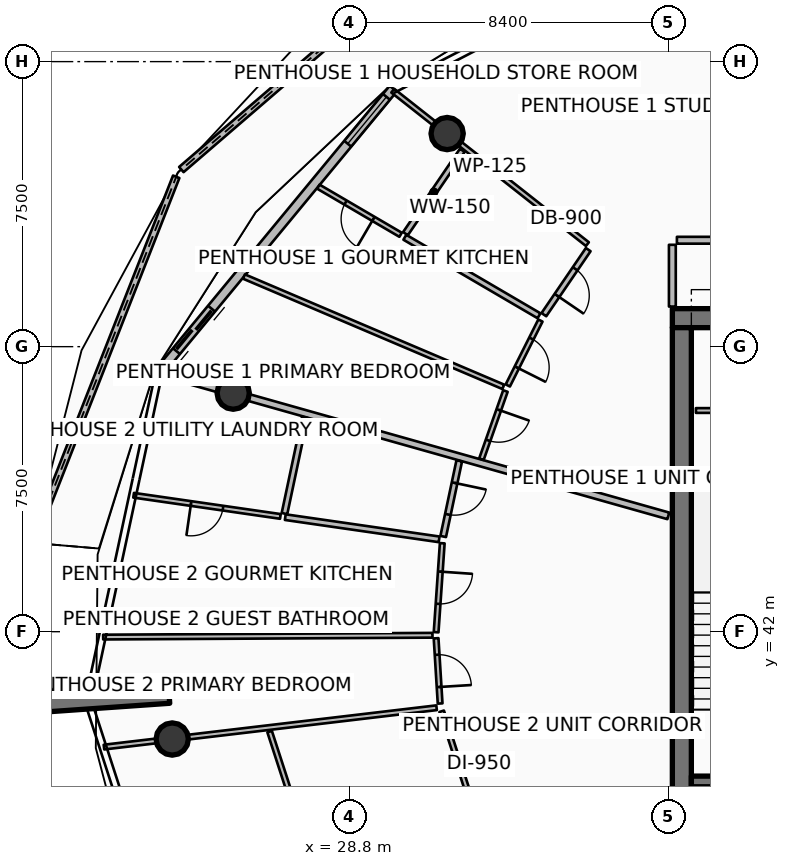
"""IFC4 building model, lengths in metres.
Left out: names, types, materials, properties, quantities, classifications, styles, units other than length and angle.
Written with IfcOpenShell. Run it as: python <this file> out.ifc"""

import sys

from ifc_helpers import new_model, si_unit, direction, frame, frame_2d, origin, origin_2d, place, context, subcontext, project, spatial, polyline, rectangle, circle, outline, extrude, element, fill, save


model = new_model("IFC4")
c1 = context("Model", 3, precision=1e-05, world=origin(), true_north=direction((0.0, 1.0)))
c2 = subcontext(c1, "Body", "Model", "MODEL_VIEW")
j1 = project(units=[si_unit("LENGTHUNIT", "METRE"), si_unit("PLANEANGLEUNIT", "RADIAN")], contexts=[c1])
p1 = place(None, origin())
s1 = spatial("IfcSite", under=j1, at=p1, CompositionType="ELEMENT")
p2 = place(p1, origin())
s2 = spatial("IfcBuilding", under=s1, at=p2, CompositionType="ELEMENT")
p3 = place(p2, frame((0.0, 0.0, 334.7)))
s3 = spatial("IfcBuildingStorey", under=s2, at=p3, CompositionType="ELEMENT", Elevation=334.7)
p4 = place(p3, frame((37.3, 50.25, 0.0), z_axis=(0.0, 0.0, 1.0), x_axis=(1.0, 0.0, 0.0)))
e1 = element("IfcWall", 1, at=p4, inside=s3, PredefinedType="SHEAR", context=c2, shape_type="SweptSolid", body=[
    extrude(rectangle(XDim=9.6, YDim=0.5, at=frame_2d((4.8, 0.0))), origin(), (0.0, 0.0, 1.0), 4.2),
])
p5 = place(p3, frame((37.55, 34.0, 0.0), z_axis=(0.0, 0.0, 1.0), x_axis=(0.0, 1.0, 0.0)))
e2 = element("IfcWall", 2, at=p5, inside=s3, PredefinedType="SHEAR", context=c2, shape_type="SweptSolid", body=[
    extrude(rectangle(XDim=16.0, YDim=0.5, at=frame_2d((8.0, 0.0))), origin(), (0.0, 0.0, 1.0), 4.2),
])
for number, where, z_axis, x_axis in (
    (3, (37.8, 38.06, 0.0), (0.0, 0.0, 1.0), (1.0, 0.0, 0.0)),
    (4, (37.8, 45.94, 0.0), (0.0, 0.0, 1.0), (1.0, 0.0, 0.0)),
):
    element("IfcWall", number, at=place(p3, frame(where, z_axis=z_axis, x_axis=x_axis)), inside=s3, PredefinedType="SHEAR", context=c2, shape_type="SweptSolid", body=[
        extrude(rectangle(XDim=3.5, YDim=0.28, at=frame_2d((1.75, 0.0))), origin(), (0.0, 0.0, 1.0), 4.2),
    ])
p6 = place(p3, frame((24.059, 40.326, 0.0), z_axis=(0.0, 0.0, 1.0), x_axis=(-0.997564163539, -0.069754853754, 0.0)))
e5 = element("IfcWall", 5, at=p6, inside=s3, PredefinedType="SOLIDWALL", context=c2, shape_type="SweptSolid", body=[
    extrude(rectangle(XDim=3.5, YDim=0.42, at=frame_2d((1.75, 0.0))), origin(), (0.0, 0.0, 1.0), 4.2),
])
for number, where, z_axis, x_axis in (
    (6, (31.374, 55.107, 0.0), (0.0, 0.0, 1.0), (1.0, 0.0, 0.0)),
    (7, (25.744, 48.277, 0.0), (0.0, 0.0, 1.0), (1.0, 0.0, 0.0)),
    (8, (24.14, 39.176, 0.0), (0.0, 0.0, 1.0), (1.0, 0.0, 0.0)),
):
    element("IfcColumn", number, at=place(p3, frame(where, z_axis=z_axis, x_axis=x_axis)), inside=s3, PredefinedType="COLUMN", context=c2, shape_type="SweptSolid", body=[
        extrude(circle(Radius=0.425, at=origin_2d()), origin(), (0.0, 0.0, 1.0), 3.94),
    ])
p7 = place(p3, frame((31.893, 60.627, 0.0), z_axis=(0.0, 0.0, 1.0), x_axis=(-0.757886838831, -0.652386035662, 0.0)))
e9 = element("IfcWall", 9, at=p7, inside=s3, PredefinedType="PARAPET", context=c2, shape_type="SweptSolid", body=[
    extrude(outline(polyline([(0.0, 0.0), (9.914, 0.0), (9.914, 1.632), (4.957, 1.798), (0.0, 1.86), (0.0, 0.0)])), frame((0.0, 0.09, 0.0), z_axis=(0.0, -1.0, 0.0), x_axis=(1.0, 0.0, 0.0)), (0.0, 0.0, 1.0), 0.18),
])
p8 = place(p3, frame((24.245, 53.97, 0.0), z_axis=(0.0, 0.0, 1.0), x_axis=(-0.36569397139, -0.930735149916, 0.0)))
e10 = element("IfcWall", 10, at=p8, inside=s3, PredefinedType="PARAPET", context=c2, shape_type="SweptSolid", body=[
    extrude(outline(polyline([(0.0, 0.0), (10.35, 0.0), (10.35, 1.233), (5.175, 1.418), (0.0, 1.632), (0.0, 0.0)])), frame((0.0, 0.09, 0.0), z_axis=(0.0, -1.0, 0.0), x_axis=(1.0, 0.0, 0.0)), (0.0, 0.0, 1.0), 0.18),
])
p9 = place(p3, frame((29.955, 56.289, 0.0), z_axis=(0.0, 0.0, 1.0), x_axis=(-0.636803612721, -0.771026042897, 0.0)))
e11 = element("IfcWall", 11, at=p9, inside=s3, PredefinedType="SOLIDWALL", context=c2, shape_type="SweptSolid", body=[
    extrude(rectangle(XDim=9.728, YDim=0.24, at=frame_2d((4.864, 0.0))), origin(), (0.0, 0.0, 1.0), 2.89),
])
p10 = place(p9, frame((7.508, 0.0, 0.0)))
e12 = element("IfcOpeningElement", 12, at=p10, cuts=e11, PredefinedType="OPENING", context=c2, shape_type="SweptSolid", body=[
    extrude(rectangle(XDim=1.45, YDim=2.15, at=frame_2d((0.725, 1.075))), frame((0.0, 0.13, 0.0), z_axis=(0.0, -1.0, 0.0), x_axis=(1.0, 0.0, 0.0)), (0.0, 0.0, 1.0), 0.26),
])
p11 = place(p9, frame((0.28, 0.0, 0.65)))
e13 = element("IfcOpeningElement", 13, at=p11, cuts=e11, PredefinedType="OPENING", context=c2, shape_type="SweptSolid", body=[
    extrude(rectangle(XDim=1.6, YDim=1.5, at=frame_2d((0.8, 0.75))), frame((0.0, 0.13, 0.0), z_axis=(0.0, -1.0, 0.0), x_axis=(1.0, 0.0, 0.0)), (0.0, 0.0, 1.0), 0.26),
])
p12 = place(p3, frame((37.92, 47.82, 0.0), z_axis=(0.0, 0.0, 1.0), x_axis=(1.0, 0.0, 0.0)))
e14 = element("IfcWall", 14, at=p12, inside=s3, PredefinedType="PARTITIONING", context=c2, shape_type="SweptSolid", body=[
    extrude(rectangle(XDim=4.08, YDim=0.125, at=frame_2d((2.04, 0.0))), origin(), (0.0, 0.0, 1.0), 3.38),
])
p13 = place(p12, frame((1.615, 0.0, 0.0)))
e15 = element("IfcOpeningElement", 15, at=p13, cuts=e14, PredefinedType="OPENING", context=c2, shape_type="SweptSolid", body=[
    extrude(rectangle(XDim=0.85, YDim=2.06, at=frame_2d((0.425, 1.03))), frame((0.0, 0.073, 0.0), z_axis=(0.0, -1.0, 0.0), x_axis=(1.0, 0.0, 0.0)), (0.0, 0.0, 1.0), 0.145),
])
p14 = place(p3, frame((42.232, 52.3, 0.0), z_axis=(0.0, 0.0, 1.0), x_axis=(-0.488623665245, 0.872494649704, 0.0)))
e16 = element("IfcWall", 16, at=p14, inside=s3, PredefinedType="PARTITIONING", context=c2, shape_type="SweptSolid", body=[
    extrude(rectangle(XDim=9.157, YDim=0.18, at=frame_2d((4.579, 0.0))), origin(), (0.0, 0.0, 1.0), 3.38),
])
p15 = place(p3, frame((37.194, 45.048, 0.0), z_axis=(0.0, 0.0, 1.0), x_axis=(-0.962457024049, 0.271434111451, 0.0)))
e17 = element("IfcWall", 17, at=p15, inside=s3, PredefinedType="PARTITIONING", context=c2, shape_type="SweptSolid", body=[
    extrude(rectangle(XDim=13.799, YDim=0.18, at=frame_2d((6.9, 0.0))), origin(), (0.0, 0.0, 1.0), 3.38),
])
p16 = place(p3, frame((42.112, 52.3, 0.0), z_axis=(0.0, 0.0, 1.0), x_axis=(-1.0, 0.0, 0.0)))
e18 = element("IfcWall", 18, at=p16, inside=s3, PredefinedType="PARTITIONING", context=c2, shape_type="SweptSolid", body=[
    extrude(rectangle(XDim=4.692, YDim=0.18, at=frame_2d((2.346, 0.0))), origin(), (0.0, 0.0, 1.0), 3.38),
])
p17 = place(p16, frame((1.796, 0.0, 0.0)))
e19 = element("IfcOpeningElement", 19, at=p17, cuts=e18, PredefinedType="OPENING", context=c2, shape_type="SweptSolid", body=[
    extrude(rectangle(XDim=1.1, YDim=2.1, at=frame_2d((0.55, 1.05))), frame((0.0, 0.1, 0.0), z_axis=(0.0, -1.0, 0.0), x_axis=(1.0, 0.0, 0.0)), (0.0, 0.0, 1.0), 0.2),
])
p18 = place(p3, frame((37.3, 52.18, 0.0), z_axis=(0.0, 0.0, 1.0), x_axis=(0.0, -1.0, 0.0)))
e20 = element("IfcWall", 20, at=p18, inside=s3, PredefinedType="PARTITIONING", context=c2, shape_type="SweptSolid", body=[
    extrude(rectangle(XDim=1.625, YDim=0.18, at=frame_2d((0.812, 0.0))), origin(), (0.0, 0.0, 1.0), 3.38),
])
p19 = place(p3, frame((35.064, 52.198, 0.0), z_axis=(0.0, 0.0, 1.0), x_axis=(-0.785319571145, 0.619090600136, 0.0)))
e21 = element("IfcWall", 21, at=p19, inside=s3, PredefinedType="PARTITIONING", context=c2, shape_type="SweptSolid", body=[
    extrude(rectangle(XDim=6.521, YDim=0.125, at=frame_2d((3.26, 0.0))), origin(), (0.0, 0.0, 1.0), 3.38),
])
p20 = place(p3, frame((35.086, 52.053, 0.0), z_axis=(0.0, 0.0, 1.0), x_axis=(-0.563373395767, -0.826202406763, 0.0)))
e22 = element("IfcWall", 22, at=p20, inside=s3, PredefinedType="PARTITIONING", context=c2, shape_type="SweptSolid", body=[
    extrude(rectangle(XDim=2.072, YDim=0.15, at=frame_2d((1.036, 0.0))), origin(), (0.0, 0.0, 1.0), 3.38),
])
p21 = place(p20, frame((0.611, 0.0, 0.0)))
e23 = element("IfcOpeningElement", 23, at=p21, cuts=e22, PredefinedType="OPENING", context=c2, shape_type="SweptSolid", body=[
    extrude(rectangle(XDim=0.85, YDim=2.06, at=frame_2d((0.425, 1.03))), frame((0.0, 0.085, 0.0), z_axis=(0.0, -1.0, 0.0), x_axis=(1.0, 0.0, 0.0)), (0.0, 0.0, 1.0), 0.17),
])
p22 = place(p3, frame((31.772, 54.666, 0.0), z_axis=(0.0, 0.0, 1.0), x_axis=(-0.563393907047, -0.826188420097, 0.0)))
e24 = element("IfcWall", 24, at=p22, inside=s3, PredefinedType="PARTITIONING", context=c2, shape_type="SweptSolid", body=[
    extrude(rectangle(XDim=2.654, YDim=0.15, at=frame_2d((1.327, 0.0))), origin(), (0.0, 0.0, 1.0), 3.38),
])
p23 = place(p3, frame((33.791, 50.313, 0.0), z_axis=(0.0, 0.0, 1.0), x_axis=(-0.863113475275, 0.505010028413, 0.0)))
e25 = element("IfcWall", 25, at=p23, inside=s3, PredefinedType="PARTITIONING", context=c2, shape_type="SweptSolid", body=[
    extrude(rectangle(XDim=4.09, YDim=0.15, at=frame_2d((2.045, 0.0))), origin(), (0.0, 0.0, 1.0), 3.38),
])
p24 = place(p3, frame((30.149, 52.444, 0.0), z_axis=(0.0, 0.0, 1.0), x_axis=(-0.863096282512, 0.505039411446, 0.0)))
e26 = element("IfcWall", 26, at=p24, inside=s3, PredefinedType="PARTITIONING", context=c2, shape_type="SweptSolid", body=[
    extrude(rectangle(XDim=2.507, YDim=0.125, at=frame_2d((1.253, 0.0))), origin(), (0.0, 0.0, 1.0), 3.38),
])
p25 = place(p24, frame((0.828, 0.0, 0.0)))
e27 = element("IfcOpeningElement", 27, at=p25, cuts=e26, PredefinedType="OPENING", context=c2, shape_type="SweptSolid", body=[
    extrude(rectangle(XDim=0.85, YDim=2.06, at=frame_2d((0.425, 1.03))), frame((0.0, 0.073, 0.0), z_axis=(0.0, -1.0, 0.0), x_axis=(1.0, 0.0, 0.0)), (0.0, 0.0, 1.0), 0.145),
])
p26 = place(p3, frame((32.851, 48.443, 0.0), z_axis=(0.0, 0.0, 1.0), x_axis=(-0.92023815321, 0.391358839655, 0.0)))
e28 = element("IfcWall", 28, at=p26, inside=s3, PredefinedType="PARTITIONING", context=c2, shape_type="SweptSolid", body=[
    extrude(rectangle(XDim=7.416, YDim=0.125, at=frame_2d((3.708, 0.0))), origin(), (0.0, 0.0, 1.0), 3.38),
])
p27 = place(p3, frame((33.828, 50.187, 0.0), z_axis=(0.0, 0.0, 1.0), x_axis=(-0.449051769977, -0.893505740262, 0.0)))
e29 = element("IfcWall", 29, at=p27, inside=s3, PredefinedType="PARTITIONING", context=c2, shape_type="SweptSolid", body=[
    extrude(rectangle(XDim=1.912, YDim=0.125, at=frame_2d((0.956, 0.0))), origin(), (0.0, 0.0, 1.0), 3.38),
])
p28 = place(p27, frame((0.531, 0.0, 0.0)))
e30 = element("IfcOpeningElement", 30, at=p28, cuts=e29, PredefinedType="OPENING", context=c2, shape_type="SweptSolid", body=[
    extrude(rectangle(XDim=0.85, YDim=2.06, at=frame_2d((0.425, 1.03))), frame((0.0, 0.073, 0.0), z_axis=(0.0, -1.0, 0.0), x_axis=(1.0, 0.0, 0.0)), (0.0, 0.0, 1.0), 0.145),
])
p29 = place(p3, frame((32.907, 48.332, 0.0), z_axis=(0.0, 0.0, 1.0), x_axis=(-0.332128336942, -0.943234206229, 0.0)))
e31 = element("IfcWall", 31, at=p29, inside=s3, PredefinedType="PARTITIONING", context=c2, shape_type="SweptSolid", body=[
    extrude(rectangle(XDim=1.902, YDim=0.125, at=frame_2d((0.951, 0.0))), origin(), (0.0, 0.0, 1.0), 3.38),
])
p30 = place(p29, frame((0.526, 0.0, 0.0)))
e32 = element("IfcOpeningElement", 32, at=p30, cuts=e31, PredefinedType="OPENING", context=c2, shape_type="SweptSolid", body=[
    extrude(rectangle(XDim=0.85, YDim=2.06, at=frame_2d((0.425, 1.03))), frame((0.0, 0.073, 0.0), z_axis=(0.0, -1.0, 0.0), x_axis=(1.0, 0.0, 0.0)), (0.0, 0.0, 1.0), 0.145),
])
p31 = place(p3, frame((31.692, 46.496, 0.0), z_axis=(0.0, 0.0, 1.0), x_axis=(-0.207455496804, -0.978244456588, 0.0)))
e33 = element("IfcWall", 33, at=p31, inside=s3, PredefinedType="PARTITIONING", context=c2, shape_type="SweptSolid", body=[
    extrude(rectangle(XDim=2.035, YDim=0.15, at=frame_2d((1.017, 0.0))), origin(), (0.0, 0.0, 1.0), 3.38),
])
p32 = place(p31, frame((0.592, 0.0, 0.0)))
e34 = element("IfcOpeningElement", 34, at=p32, cuts=e33, PredefinedType="OPENING", context=c2, shape_type="SweptSolid", body=[
    extrude(rectangle(XDim=0.85, YDim=2.06, at=frame_2d((0.425, 1.03))), frame((0.0, 0.085, 0.0), z_axis=(0.0, -1.0, 0.0), x_axis=(1.0, 0.0, 0.0)), (0.0, 0.0, 1.0), 0.17),
])
p33 = place(p3, frame((27.631, 47.641, 0.0), z_axis=(0.0, 0.0, 1.0), x_axis=(-0.207597158551, -0.978214403779, 0.0)))
e35 = element("IfcWall", 35, at=p33, inside=s3, PredefinedType="PARTITIONING", context=c2, shape_type="SweptSolid", body=[
    extrude(rectangle(XDim=2.59, YDim=0.15, at=frame_2d((1.295, 0.0))), origin(), (0.0, 0.0, 1.0), 3.38),
])
p34 = place(p3, frame((31.162, 44.43, 0.0), z_axis=(0.0, 0.0, 1.0), x_axis=(-0.989744304981, 0.142850308916, 0.0)))
e36 = element("IfcWall", 36, at=p34, inside=s3, PredefinedType="PARTITIONING", context=c2, shape_type="SweptSolid", body=[
    extrude(rectangle(XDim=4.09, YDim=0.15, at=frame_2d((2.045, 0.0))), origin(), (0.0, 0.0, 1.0), 3.38),
])
p35 = place(p3, frame((26.986, 45.033, 0.0), z_axis=(0.0, 0.0, 1.0), x_axis=(-0.989744483193, 0.142849074164, 0.0)))
e37 = element("IfcWall", 37, at=p35, inside=s3, PredefinedType="PARTITIONING", context=c2, shape_type="SweptSolid", body=[
    extrude(rectangle(XDim=3.902, YDim=0.125, at=frame_2d((1.951, 0.0))), origin(), (0.0, 0.0, 1.0), 3.38),
])
p36 = place(p35, frame((1.526, 0.0, 0.0)))
e38 = element("IfcOpeningElement", 38, at=p36, cuts=e37, PredefinedType="OPENING", context=c2, shape_type="SweptSolid", body=[
    extrude(rectangle(XDim=0.85, YDim=2.06, at=frame_2d((0.425, 1.03))), frame((0.0, 0.073, 0.0), z_axis=(0.0, -1.0, 0.0), x_axis=(1.0, 0.0, 0.0)), (0.0, 0.0, 1.0), 0.145),
])
p37 = place(p3, frame((30.988, 41.906, 0.0), z_axis=(0.0, 0.0, 1.0), x_axis=(-0.999984908948, -0.005493803382, 0.0)))
e39 = element("IfcWall", 39, at=p37, inside=s3, PredefinedType="PARTITIONING", context=c2, shape_type="SweptSolid", body=[
    extrude(rectangle(XDim=8.666, YDim=0.125, at=frame_2d((4.333, 0.0))), origin(), (0.0, 0.0, 1.0), 3.38),
])
p38 = place(p3, frame((31.245, 44.327, 0.0), z_axis=(0.0, 0.0, 1.0), x_axis=(-0.068873502497, -0.997625400967, 0.0)))
e40 = element("IfcWall", 40, at=p38, inside=s3, PredefinedType="PARTITIONING", context=c2, shape_type="SweptSolid", body=[
    extrude(rectangle(XDim=2.347, YDim=0.125, at=frame_2d((1.173, 0.0))), origin(), (0.0, 0.0, 1.0), 3.38),
])
p39 = place(p38, frame((0.748, 0.0, 0.0)))
e41 = element("IfcOpeningElement", 41, at=p39, cuts=e40, PredefinedType="OPENING", context=c2, shape_type="SweptSolid", body=[
    extrude(rectangle(XDim=0.85, YDim=2.06, at=frame_2d((0.425, 1.03))), frame((0.0, 0.073, 0.0), z_axis=(0.0, -1.0, 0.0), x_axis=(1.0, 0.0, 0.0)), (0.0, 0.0, 1.0), 0.145),
])
p40 = place(p3, frame((31.083, 41.827, 0.0), z_axis=(0.0, 0.0, 1.0), x_axis=(0.061626842896, -0.998099259711, 0.0)))
e42 = element("IfcWall", 42, at=p40, inside=s3, PredefinedType="PARTITIONING", context=c2, shape_type="SweptSolid", body=[
    extrude(rectangle(XDim=1.719, YDim=0.125, at=frame_2d((0.86, 0.0))), origin(), (0.0, 0.0, 1.0), 3.38),
])
p41 = place(p40, frame((0.435, 0.0, 0.0)))
e43 = element("IfcOpeningElement", 43, at=p41, cuts=e42, PredefinedType="OPENING", context=c2, shape_type="SweptSolid", body=[
    extrude(rectangle(XDim=0.85, YDim=2.06, at=frame_2d((0.425, 1.03))), frame((0.0, 0.073, 0.0), z_axis=(0.0, -1.0, 0.0), x_axis=(1.0, 0.0, 0.0)), (0.0, 0.0, 1.0), 0.145),
])
p42 = place(p3, frame((31.096, 39.999, 0.0), z_axis=(0.0, 0.0, 1.0), x_axis=(-0.993069250604, -0.117530691761, 0.0)))
e44 = element("IfcWall", 44, at=p42, inside=s3, PredefinedType="PARTITIONING", context=c2, shape_type="SweptSolid", body=[
    extrude(rectangle(XDim=8.814, YDim=0.125, at=frame_2d((4.407, 0.0))), origin(), (0.0, 0.0, 1.0), 3.38),
])
p43 = place(p3, frame((31.229, 39.906, 0.0), z_axis=(0.0, 0.0, 1.0), x_axis=(0.309023798792, -0.951054305379, 0.0)))
e45 = element("IfcWall", 45, at=p43, inside=s3, PredefinedType="PARTITIONING", context=c2, shape_type="SweptSolid", body=[
    extrude(rectangle(XDim=6.383, YDim=0.125, at=frame_2d((3.191, 0.0))), origin(), (0.0, 0.0, 1.0), 3.38),
])
p44 = place(p43, frame((2.741, 0.0, 0.0)))
e46 = element("IfcOpeningElement", 46, at=p44, cuts=e45, PredefinedType="OPENING", context=c2, shape_type="SweptSolid", body=[
    extrude(rectangle(XDim=0.9, YDim=2.08, at=frame_2d((0.45, 1.04))), frame((0.0, 0.073, 0.0), z_axis=(0.0, -1.0, 0.0), x_axis=(1.0, 0.0, 0.0)), (0.0, 0.0, 1.0), 0.145),
])
p45 = place(p3, frame((26.703, 39.371, 0.0), z_axis=(0.0, 0.0, 1.0), x_axis=(0.309021134762, -0.951055170992, 0.0)))
e47 = element("IfcWall", 47, at=p45, inside=s3, PredefinedType="PARTITIONING", context=c2, shape_type="SweptSolid", body=[
    extrude(rectangle(XDim=8.161, YDim=0.125, at=frame_2d((4.081, 0.0))), origin(), (0.0, 0.0, 1.0), 3.38),
])
p46 = place(p45, frame((3.631, 0.0, 0.0)))
e48 = element("IfcOpeningElement", 48, at=p46, cuts=e47, PredefinedType="OPENING", context=c2, shape_type="SweptSolid", body=[
    extrude(rectangle(XDim=0.9, YDim=2.08, at=frame_2d((0.45, 1.04))), frame((0.0, 0.073, 0.0), z_axis=(0.0, -1.0, 0.0), x_axis=(1.0, 0.0, 0.0)), (0.0, 0.0, 1.0), 0.145),
])
p47 = place(p10, origin())
e49 = element("IfcDoor", 49, at=p47, inside=s3, OperationType="DOUBLE_DOOR_SLIDING", PredefinedType="DOOR", context=c2, shape_type="SweptSolid", body=[
    extrude(rectangle(XDim=1.45, YDim=2.15, at=frame_2d((0.725, 1.075))), frame((0.0, 0.025, 0.0), z_axis=(0.0, -1.0, 0.0), x_axis=(1.0, 0.0, 0.0)), (0.0, 0.0, 1.0), 0.05),
])
fill(e12, e49)
p48 = place(p11, origin())
e50 = element("IfcWindow", 50, at=p48, inside=s3, PartitioningType="SINGLE_PANEL", PredefinedType="WINDOW", context=c2, shape_type="SweptSolid", body=[
    extrude(rectangle(XDim=1.6, YDim=1.5, at=frame_2d((0.8, 0.75))), frame((0.0, 0.03, 0.0), z_axis=(0.0, -1.0, 0.0), x_axis=(1.0, 0.0, 0.0)), (0.0, 0.0, 1.0), 0.06),
])
fill(e13, e50)
p49 = place(p21, origin())
e51 = element("IfcDoor", 51, at=p49, inside=s3, OperationType="SINGLE_SWING_RIGHT", PredefinedType="DOOR", context=c2, shape_type="SweptSolid", body=[
    extrude(rectangle(XDim=0.85, YDim=2.06, at=frame_2d((0.425, 1.03))), frame((0.0, 0.025, 0.0), z_axis=(0.0, -1.0, 0.0), x_axis=(1.0, 0.0, 0.0)), (0.0, 0.0, 1.0), 0.05),
])
fill(e23, e51)
p50 = place(p25, origin())
e52 = element("IfcDoor", 52, at=p50, inside=s3, OperationType="SINGLE_SWING_LEFT", PredefinedType="DOOR", context=c2, shape_type="SweptSolid", body=[
    extrude(rectangle(XDim=0.85, YDim=2.06, at=frame_2d((0.425, 1.03))), frame((0.0, 0.025, 0.0), z_axis=(0.0, -1.0, 0.0), x_axis=(1.0, 0.0, 0.0)), (0.0, 0.0, 1.0), 0.05),
])
fill(e27, e52)
p51 = place(p28, origin())
e53 = element("IfcDoor", 53, at=p51, inside=s3, OperationType="SINGLE_SWING_RIGHT", PredefinedType="DOOR", context=c2, shape_type="SweptSolid", body=[
    extrude(rectangle(XDim=0.85, YDim=2.06, at=frame_2d((0.425, 1.03))), frame((0.0, 0.025, 0.0), z_axis=(0.0, -1.0, 0.0), x_axis=(1.0, 0.0, 0.0)), (0.0, 0.0, 1.0), 0.05),
])
fill(e30, e53)
p52 = place(p30, origin())
e54 = element("IfcDoor", 54, at=p52, inside=s3, OperationType="SINGLE_SWING_LEFT", PredefinedType="DOOR", context=c2, shape_type="SweptSolid", body=[
    extrude(rectangle(XDim=0.85, YDim=2.06, at=frame_2d((0.425, 1.03))), frame((0.0, 0.025, 0.0), z_axis=(0.0, -1.0, 0.0), x_axis=(1.0, 0.0, 0.0)), (0.0, 0.0, 1.0), 0.05),
])
fill(e32, e54)
p53 = place(p32, origin())
e55 = element("IfcDoor", 55, at=p53, inside=s3, OperationType="SINGLE_SWING_LEFT", PredefinedType="DOOR", context=c2, shape_type="SweptSolid", body=[
    extrude(rectangle(XDim=0.85, YDim=2.06, at=frame_2d((0.425, 1.03))), frame((0.0, 0.025, 0.0), z_axis=(0.0, -1.0, 0.0), x_axis=(1.0, 0.0, 0.0)), (0.0, 0.0, 1.0), 0.05),
])
fill(e34, e55)
p54 = place(p36, origin())
e56 = element("IfcDoor", 56, at=p54, inside=s3, OperationType="SINGLE_SWING_RIGHT", PredefinedType="DOOR", context=c2, shape_type="SweptSolid", body=[
    extrude(rectangle(XDim=0.85, YDim=2.06, at=frame_2d((0.425, 1.03))), frame((0.0, 0.025, 0.0), z_axis=(0.0, -1.0, 0.0), x_axis=(1.0, 0.0, 0.0)), (0.0, 0.0, 1.0), 0.05),
])
fill(e38, e56)
p55 = place(p39, origin())
e57 = element("IfcDoor", 57, at=p55, inside=s3, OperationType="SINGLE_SWING_LEFT", PredefinedType="DOOR", context=c2, shape_type="SweptSolid", body=[
    extrude(rectangle(XDim=0.85, YDim=2.06, at=frame_2d((0.425, 1.03))), frame((0.0, 0.025, 0.0), z_axis=(0.0, -1.0, 0.0), x_axis=(1.0, 0.0, 0.0)), (0.0, 0.0, 1.0), 0.05),
])
fill(e41, e57)
p56 = place(p41, origin())
e58 = element("IfcDoor", 58, at=p56, inside=s3, OperationType="SINGLE_SWING_RIGHT", PredefinedType="DOOR", context=c2, shape_type="SweptSolid", body=[
    extrude(rectangle(XDim=0.85, YDim=2.06, at=frame_2d((0.425, 1.03))), frame((0.0, 0.025, 0.0), z_axis=(0.0, -1.0, 0.0), x_axis=(1.0, 0.0, 0.0)), (0.0, 0.0, 1.0), 0.05),
])
fill(e43, e58)
save(model, sys.argv[1])
